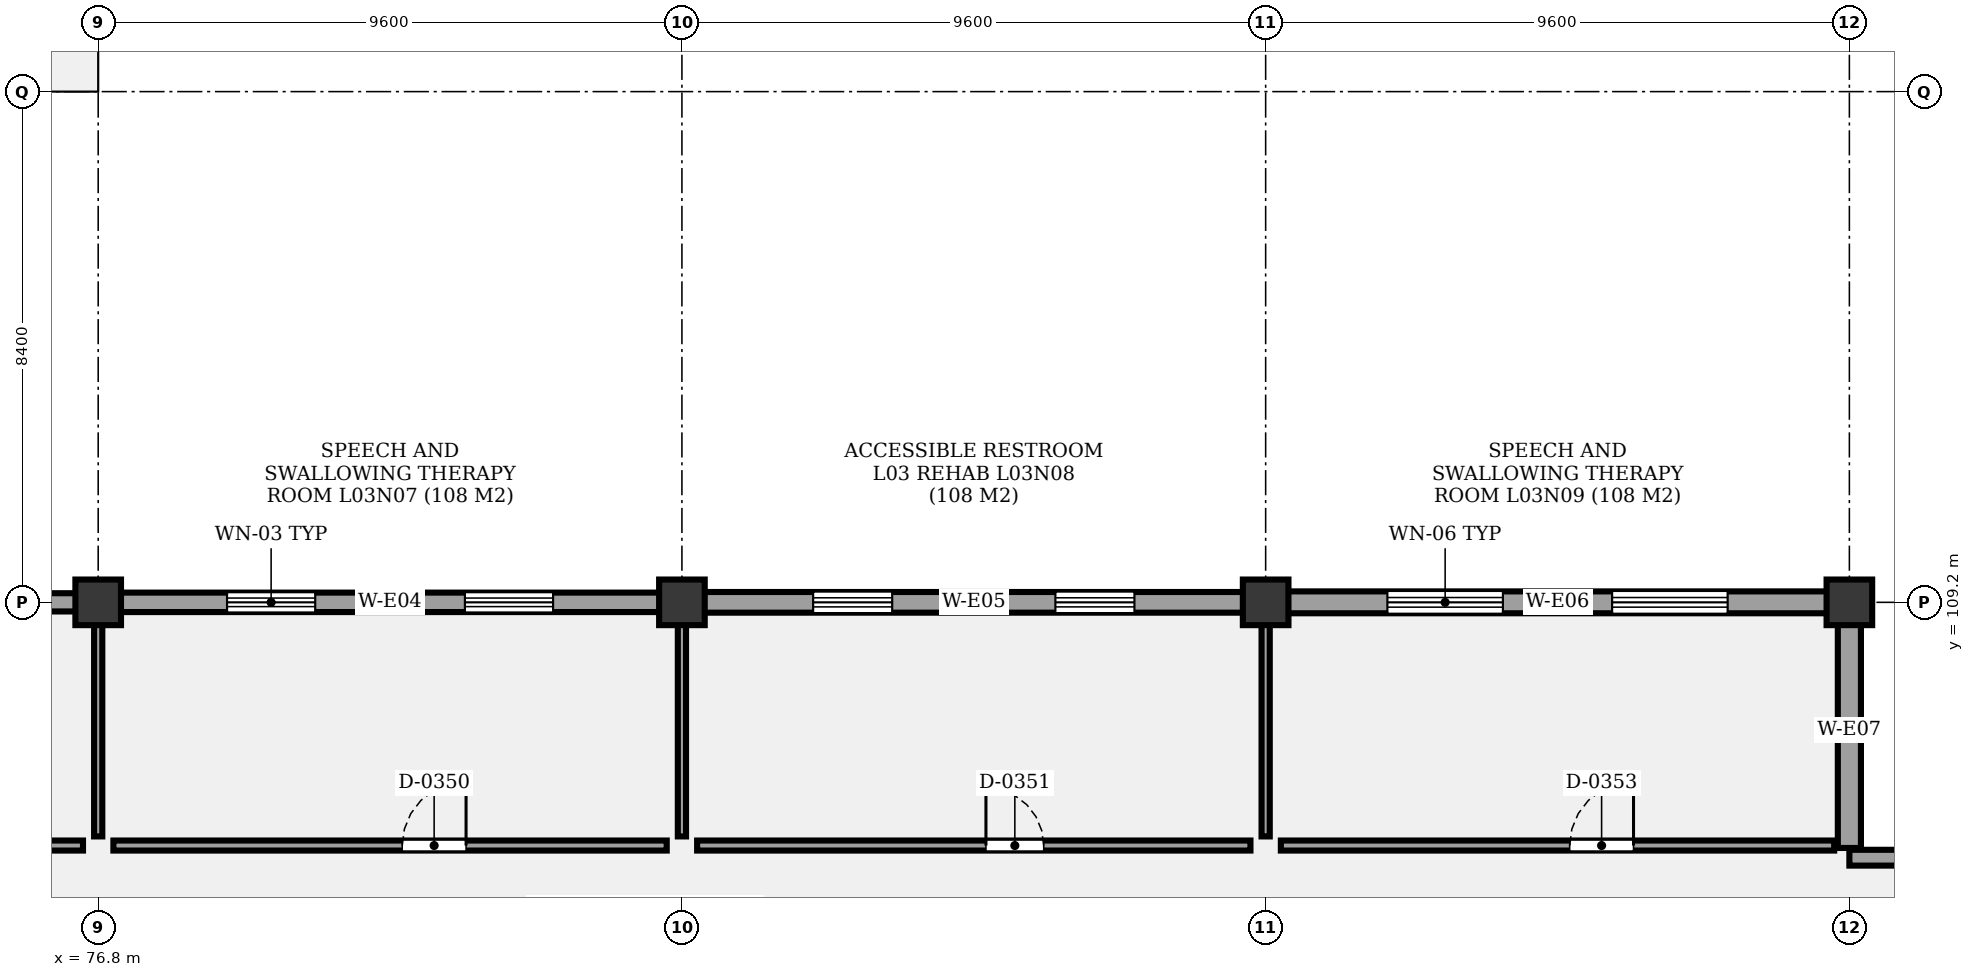
"""IFC4 building model, lengths in metres.
Left out: names, types, materials, properties, quantities, classifications, styles, units other than length and angle.
Written with IfcOpenShell. Run it as: python <this file> out.ifc"""

import sys

from ifc_helpers import new_model, si_unit, direction, frame, frame_2d, origin, origin_2d, place, context, subcontext, project, spatial, rectangle, extrude, element, fill, save


model = new_model("IFC4")
c1 = context("Model", 3, precision=1e-05, world=origin(), true_north=direction((0.0, 1.0)))
c2 = subcontext(c1, "Body", "Model", "MODEL_VIEW")
j1 = project(units=[si_unit("LENGTHUNIT", "METRE"), si_unit("PLANEANGLEUNIT", "RADIAN")], contexts=[c1])
p1 = place(None, origin())
s1 = spatial("IfcSite", under=j1, at=p1, CompositionType="ELEMENT")
p2 = place(p1, origin())
s2 = spatial("IfcBuilding", under=s1, at=p2, CompositionType="ELEMENT")
p3 = place(p2, frame((0.0, 0.0, 13.5)))
s3 = spatial("IfcBuildingStorey", under=s2, at=p3, CompositionType="ELEMENT", Elevation=13.5)
for number, where, z_axis, x_axis in (
    (1, (76.8, 109.2, 0.0), (0.0, 0.0, 1.0), (1.0, 0.0, 0.0)),
    (2, (86.4, 109.2, 0.0), (0.0, 0.0, 1.0), (1.0, 0.0, 0.0)),
    (3, (96.0, 109.2, 0.0), (0.0, 0.0, 1.0), (1.0, 0.0, 0.0)),
    (4, (105.6, 109.2, 0.0), (0.0, 0.0, 1.0), (1.0, 0.0, 0.0)),
):
    element("IfcColumn", number, at=place(p3, frame(where, z_axis=z_axis, x_axis=x_axis)), inside=s3, PredefinedType="COLUMN", context=c2, shape_type="SweptSolid", body=[
        extrude(rectangle(XDim=0.75, YDim=0.75, at=origin_2d()), origin(), (0.0, 0.0, 1.0), 4.3),
    ])
p4 = place(p3, frame((105.6, 105.0, 0.0), z_axis=(0.0, 0.0, 1.0), x_axis=(1.0, 0.0, 0.0)))
e5 = element("IfcWall", 5, at=p4, inside=s3, PredefinedType="SOLIDWALL", context=c2, shape_type="SweptSolid", body=[
    extrude(rectangle(XDim=9.6, YDim=0.26, at=frame_2d((4.8, 0.0))), origin(), (0.0, 0.0, 1.0), 3.49),
])
p5 = place(p4, frame((2.041, 0.0, 0.85)))
e6 = element("IfcOpeningElement", 6, at=p5, cuts=e5, PredefinedType="OPENING", context=c2, shape_type="SweptSolid", body=[
    extrude(rectangle(XDim=1.75, YDim=1.2, at=frame_2d((0.875, 0.6))), frame((0.0, 0.14, 0.0), z_axis=(0.0, -1.0, 0.0), x_axis=(1.0, 0.0, 0.0)), (0.0, 0.0, 1.0), 0.28),
])
p6 = place(p4, frame((5.809, 0.0, 0.85)))
e7 = element("IfcOpeningElement", 7, at=p6, cuts=e5, PredefinedType="OPENING", context=c2, shape_type="SweptSolid", body=[
    extrude(rectangle(XDim=1.75, YDim=1.2, at=frame_2d((0.875, 0.6))), frame((0.0, 0.14, 0.0), z_axis=(0.0, -1.0, 0.0), x_axis=(1.0, 0.0, 0.0)), (0.0, 0.0, 1.0), 0.28),
])
p7 = place(p3, frame((67.2, 109.2, 0.0), z_axis=(0.0, 0.0, 1.0), x_axis=(1.0, 0.0, 0.0)))
e8 = element("IfcWall", 8, at=p7, inside=s3, PredefinedType="SOLIDWALL", context=c2, shape_type="SweptSolid", body=[
    extrude(rectangle(XDim=9.6, YDim=0.3, at=frame_2d((4.8, 0.0))), origin(), (0.0, 0.0, 1.0), 3.49),
])
p8 = place(p7, frame((2.158, 0.0, 0.85)))
e9 = element("IfcOpeningElement", 9, at=p8, cuts=e8, PredefinedType="OPENING", context=c2, shape_type="SweptSolid", body=[
    extrude(rectangle(XDim=1.3, YDim=1.2, at=frame_2d((0.65, 0.6))), frame((0.0, 0.16, 0.0), z_axis=(0.0, -1.0, 0.0), x_axis=(1.0, 0.0, 0.0)), (0.0, 0.0, 1.0), 0.32),
])
p9 = place(p7, frame((6.142, 0.0, 0.85)))
e10 = element("IfcOpeningElement", 10, at=p9, cuts=e8, PredefinedType="OPENING", context=c2, shape_type="SweptSolid", body=[
    extrude(rectangle(XDim=1.3, YDim=1.2, at=frame_2d((0.65, 0.6))), frame((0.0, 0.16, 0.0), z_axis=(0.0, -1.0, 0.0), x_axis=(1.0, 0.0, 0.0)), (0.0, 0.0, 1.0), 0.32),
])
p10 = place(p3, frame((76.8, 109.2, 0.0), z_axis=(0.0, 0.0, 1.0), x_axis=(1.0, 0.0, 0.0)))
e11 = element("IfcWall", 11, at=p10, inside=s3, PredefinedType="SOLIDWALL", context=c2, shape_type="SweptSolid", body=[
    extrude(rectangle(XDim=9.6, YDim=0.32, at=frame_2d((4.8, 0.0))), origin(), (0.0, 0.0, 1.0), 3.49),
])
p11 = place(p10, frame((2.119, 0.0, 0.85)))
e12 = element("IfcOpeningElement", 12, at=p11, cuts=e11, PredefinedType="OPENING", context=c2, shape_type="SweptSolid", body=[
    extrude(rectangle(XDim=1.45, YDim=1.2, at=frame_2d((0.725, 0.6))), frame((0.0, 0.17, 0.0), z_axis=(0.0, -1.0, 0.0), x_axis=(1.0, 0.0, 0.0)), (0.0, 0.0, 1.0), 0.34),
])
p12 = place(p10, frame((6.031, 0.0, 0.85)))
e13 = element("IfcOpeningElement", 13, at=p12, cuts=e11, PredefinedType="OPENING", context=c2, shape_type="SweptSolid", body=[
    extrude(rectangle(XDim=1.45, YDim=1.2, at=frame_2d((0.725, 0.6))), frame((0.0, 0.17, 0.0), z_axis=(0.0, -1.0, 0.0), x_axis=(1.0, 0.0, 0.0)), (0.0, 0.0, 1.0), 0.34),
])
p13 = place(p3, frame((86.4, 109.2, 0.0), z_axis=(0.0, 0.0, 1.0), x_axis=(1.0, 0.0, 0.0)))
e14 = element("IfcWall", 14, at=p13, inside=s3, PredefinedType="SOLIDWALL", context=c2, shape_type="SweptSolid", body=[
    extrude(rectangle(XDim=9.6, YDim=0.34, at=frame_2d((4.8, 0.0))), origin(), (0.0, 0.0, 1.0), 3.49),
])
p14 = place(p13, frame((2.158, 0.0, 0.85)))
e15 = element("IfcOpeningElement", 15, at=p14, cuts=e14, PredefinedType="OPENING", context=c2, shape_type="SweptSolid", body=[
    extrude(rectangle(XDim=1.3, YDim=1.2, at=frame_2d((0.65, 0.6))), frame((0.0, 0.18, 0.0), z_axis=(0.0, -1.0, 0.0), x_axis=(1.0, 0.0, 0.0)), (0.0, 0.0, 1.0), 0.36),
])
p15 = place(p13, frame((6.142, 0.0, 0.85)))
e16 = element("IfcOpeningElement", 16, at=p15, cuts=e14, PredefinedType="OPENING", context=c2, shape_type="SweptSolid", body=[
    extrude(rectangle(XDim=1.3, YDim=1.2, at=frame_2d((0.65, 0.6))), frame((0.0, 0.18, 0.0), z_axis=(0.0, -1.0, 0.0), x_axis=(1.0, 0.0, 0.0)), (0.0, 0.0, 1.0), 0.36),
])
p16 = place(p3, frame((96.0, 109.2, 0.0), z_axis=(0.0, 0.0, 1.0), x_axis=(1.0, 0.0, 0.0)))
e17 = element("IfcWall", 17, at=p16, inside=s3, PredefinedType="SOLIDWALL", context=c2, shape_type="SweptSolid", body=[
    extrude(rectangle(XDim=9.6, YDim=0.36, at=frame_2d((4.8, 0.0))), origin(), (0.0, 0.0, 1.0), 3.49),
])
p17 = place(p16, frame((2.002, 0.0, 0.85)))
e18 = element("IfcOpeningElement", 18, at=p17, cuts=e17, PredefinedType="OPENING", context=c2, shape_type="SweptSolid", body=[
    extrude(rectangle(XDim=1.9, YDim=1.2, at=frame_2d((0.95, 0.6))), frame((0.0, 0.19, 0.0), z_axis=(0.0, -1.0, 0.0), x_axis=(1.0, 0.0, 0.0)), (0.0, 0.0, 1.0), 0.38),
])
p18 = place(p16, frame((5.698, 0.0, 0.85)))
e19 = element("IfcOpeningElement", 19, at=p18, cuts=e17, PredefinedType="OPENING", context=c2, shape_type="SweptSolid", body=[
    extrude(rectangle(XDim=1.9, YDim=1.2, at=frame_2d((0.95, 0.6))), frame((0.0, 0.19, 0.0), z_axis=(0.0, -1.0, 0.0), x_axis=(1.0, 0.0, 0.0)), (0.0, 0.0, 1.0), 0.38),
])
p19 = place(p3, frame((105.6, 109.04, 0.0), z_axis=(0.0, 0.0, 1.0), x_axis=(0.0, -1.0, 0.0)))
e20 = element("IfcWall", 20, at=p19, inside=s3, PredefinedType="SOLIDWALL", context=c2, shape_type="SweptSolid", body=[
    extrude(rectangle(XDim=3.88, YDim=0.38, at=frame_2d((1.94, 0.0))), origin(), (0.0, 0.0, 1.0), 3.49),
])
p20 = place(p3, frame((67.45, 105.2, 0.0), z_axis=(0.0, 0.0, 1.0), x_axis=(1.0, 0.0, 0.0)))
e21 = element("IfcWall", 21, at=p20, inside=s3, PredefinedType="PARTITIONING", context=c2, shape_type="SweptSolid", body=[
    extrude(rectangle(XDim=9.1, YDim=0.165, at=frame_2d((4.55, 0.0))), origin(), (0.0, 0.0, 1.0), 3.4),
])
p21 = place(p20, frame((4.75, 0.0, 0.0)))
e22 = element("IfcOpeningElement", 22, at=p21, cuts=e21, PredefinedType="OPENING", context=c2, shape_type="SweptSolid", body=[
    extrude(rectangle(XDim=0.95, YDim=2.1, at=frame_2d((0.475, 1.05))), frame((0.0, 0.093, 0.0), z_axis=(0.0, -1.0, 0.0), x_axis=(1.0, 0.0, 0.0)), (0.0, 0.0, 1.0), 0.185),
])
p22 = place(p3, frame((77.05, 105.2, 0.0), z_axis=(0.0, 0.0, 1.0), x_axis=(1.0, 0.0, 0.0)))
e23 = element("IfcWall", 23, at=p22, inside=s3, PredefinedType="PARTITIONING", context=c2, shape_type="SweptSolid", body=[
    extrude(rectangle(XDim=9.1, YDim=0.165, at=frame_2d((4.55, 0.0))), origin(), (0.0, 0.0, 1.0), 3.4),
])
p23 = place(p22, frame((4.75, 0.0, 0.0)))
e24 = element("IfcOpeningElement", 24, at=p23, cuts=e23, PredefinedType="OPENING", context=c2, shape_type="SweptSolid", body=[
    extrude(rectangle(XDim=1.05, YDim=2.1, at=frame_2d((0.525, 1.05))), frame((0.0, 0.093, 0.0), z_axis=(0.0, -1.0, 0.0), x_axis=(1.0, 0.0, 0.0)), (0.0, 0.0, 1.0), 0.185),
])
p24 = place(p3, frame((76.8, 105.35, 0.0), z_axis=(0.0, 0.0, 1.0), x_axis=(0.0, 1.0, 0.0)))
e25 = element("IfcWall", 25, at=p24, inside=s3, PredefinedType="PARTITIONING", context=c2, shape_type="SweptSolid", body=[
    extrude(rectangle(XDim=3.65, YDim=0.135, at=frame_2d((1.825, 0.0))), origin(), (0.0, 0.0, 1.0), 3.4),
])
p25 = place(p3, frame((86.65, 105.2, 0.0), z_axis=(0.0, 0.0, 1.0), x_axis=(1.0, 0.0, 0.0)))
e26 = element("IfcWall", 26, at=p25, inside=s3, PredefinedType="PARTITIONING", context=c2, shape_type="SweptSolid", body=[
    extrude(rectangle(XDim=9.1, YDim=0.165, at=frame_2d((4.55, 0.0))), origin(), (0.0, 0.0, 1.0), 3.4),
])
p26 = place(p25, frame((4.75, 0.0, 0.0)))
e27 = element("IfcOpeningElement", 27, at=p26, cuts=e26, PredefinedType="OPENING", context=c2, shape_type="SweptSolid", body=[
    extrude(rectangle(XDim=0.95, YDim=2.1, at=frame_2d((0.475, 1.05))), frame((0.0, 0.093, 0.0), z_axis=(0.0, -1.0, 0.0), x_axis=(1.0, 0.0, 0.0)), (0.0, 0.0, 1.0), 0.185),
])
p27 = place(p3, frame((86.4, 105.35, 0.0), z_axis=(0.0, 0.0, 1.0), x_axis=(0.0, 1.0, 0.0)))
e28 = element("IfcWall", 28, at=p27, inside=s3, PredefinedType="PARTITIONING", context=c2, shape_type="SweptSolid", body=[
    extrude(rectangle(XDim=3.65, YDim=0.135, at=frame_2d((1.825, 0.0))), origin(), (0.0, 0.0, 1.0), 3.4),
])
p28 = place(p3, frame((96.25, 105.2, 0.0), z_axis=(0.0, 0.0, 1.0), x_axis=(1.0, 0.0, 0.0)))
e29 = element("IfcWall", 29, at=p28, inside=s3, PredefinedType="PARTITIONING", context=c2, shape_type="SweptSolid", body=[
    extrude(rectangle(XDim=9.1, YDim=0.165, at=frame_2d((4.55, 0.0))), origin(), (0.0, 0.0, 1.0), 3.4),
])
p29 = place(p28, frame((4.75, 0.0, 0.0)))
e30 = element("IfcOpeningElement", 30, at=p29, cuts=e29, PredefinedType="OPENING", context=c2, shape_type="SweptSolid", body=[
    extrude(rectangle(XDim=1.05, YDim=2.1, at=frame_2d((0.525, 1.05))), frame((0.0, 0.093, 0.0), z_axis=(0.0, -1.0, 0.0), x_axis=(1.0, 0.0, 0.0)), (0.0, 0.0, 1.0), 0.185),
])
p30 = place(p3, frame((96.0, 105.35, 0.0), z_axis=(0.0, 0.0, 1.0), x_axis=(0.0, 1.0, 0.0)))
e31 = element("IfcWall", 31, at=p30, inside=s3, PredefinedType="PARTITIONING", context=c2, shape_type="SweptSolid", body=[
    extrude(rectangle(XDim=3.65, YDim=0.135, at=frame_2d((1.825, 0.0))), origin(), (0.0, 0.0, 1.0), 3.4),
])
p31 = place(p11, origin())
e32 = element("IfcWindow", 32, at=p31, inside=s3, PartitioningType="SINGLE_PANEL", PredefinedType="WINDOW", context=c2, shape_type="SweptSolid", body=[
    extrude(rectangle(XDim=1.45, YDim=1.2, at=frame_2d((0.725, 0.6))), frame((0.0, 0.03, 0.0), z_axis=(0.0, -1.0, 0.0), x_axis=(1.0, 0.0, 0.0)), (0.0, 0.0, 1.0), 0.06),
])
fill(e12, e32)
p32 = place(p12, origin())
e33 = element("IfcWindow", 33, at=p32, inside=s3, PartitioningType="SINGLE_PANEL", PredefinedType="WINDOW", context=c2, shape_type="SweptSolid", body=[
    extrude(rectangle(XDim=1.45, YDim=1.2, at=frame_2d((0.725, 0.6))), frame((0.0, 0.03, 0.0), z_axis=(0.0, -1.0, 0.0), x_axis=(1.0, 0.0, 0.0)), (0.0, 0.0, 1.0), 0.06),
])
fill(e13, e33)
p33 = place(p14, origin())
e34 = element("IfcWindow", 34, at=p33, inside=s3, PartitioningType="SINGLE_PANEL", PredefinedType="WINDOW", context=c2, shape_type="SweptSolid", body=[
    extrude(rectangle(XDim=1.3, YDim=1.2, at=frame_2d((0.65, 0.6))), frame((0.0, 0.03, 0.0), z_axis=(0.0, -1.0, 0.0), x_axis=(1.0, 0.0, 0.0)), (0.0, 0.0, 1.0), 0.06),
])
fill(e15, e34)
p34 = place(p15, origin())
e35 = element("IfcWindow", 35, at=p34, inside=s3, PartitioningType="SINGLE_PANEL", PredefinedType="WINDOW", context=c2, shape_type="SweptSolid", body=[
    extrude(rectangle(XDim=1.3, YDim=1.2, at=frame_2d((0.65, 0.6))), frame((0.0, 0.03, 0.0), z_axis=(0.0, -1.0, 0.0), x_axis=(1.0, 0.0, 0.0)), (0.0, 0.0, 1.0), 0.06),
])
fill(e16, e35)
p35 = place(p17, origin())
e36 = element("IfcWindow", 36, at=p35, inside=s3, PartitioningType="SINGLE_PANEL", PredefinedType="WINDOW", context=c2, shape_type="SweptSolid", body=[
    extrude(rectangle(XDim=1.9, YDim=1.2, at=frame_2d((0.95, 0.6))), frame((0.0, 0.03, 0.0), z_axis=(0.0, -1.0, 0.0), x_axis=(1.0, 0.0, 0.0)), (0.0, 0.0, 1.0), 0.06),
])
fill(e18, e36)
p36 = place(p18, origin())
e37 = element("IfcWindow", 37, at=p36, inside=s3, PartitioningType="SINGLE_PANEL", PredefinedType="WINDOW", context=c2, shape_type="SweptSolid", body=[
    extrude(rectangle(XDim=1.9, YDim=1.2, at=frame_2d((0.95, 0.6))), frame((0.0, 0.03, 0.0), z_axis=(0.0, -1.0, 0.0), x_axis=(1.0, 0.0, 0.0)), (0.0, 0.0, 1.0), 0.06),
])
fill(e19, e37)
p37 = place(p23, origin())
e38 = element("IfcDoor", 38, at=p37, inside=s3, OperationType="SINGLE_SWING_RIGHT", PredefinedType="DOOR", context=c2, shape_type="SweptSolid", body=[
    extrude(rectangle(XDim=1.05, YDim=2.1, at=frame_2d((0.525, 1.05))), frame((0.0, 0.025, 0.0), z_axis=(0.0, -1.0, 0.0), x_axis=(1.0, 0.0, 0.0)), (0.0, 0.0, 1.0), 0.05),
])
fill(e24, e38)
p38 = place(p26, origin())
e39 = element("IfcDoor", 39, at=p38, inside=s3, OperationType="SINGLE_SWING_LEFT", PredefinedType="DOOR", context=c2, shape_type="SweptSolid", body=[
    extrude(rectangle(XDim=0.95, YDim=2.1, at=frame_2d((0.475, 1.05))), frame((0.0, 0.025, 0.0), z_axis=(0.0, -1.0, 0.0), x_axis=(1.0, 0.0, 0.0)), (0.0, 0.0, 1.0), 0.05),
])
fill(e27, e39)
p39 = place(p29, origin())
e40 = element("IfcDoor", 40, at=p39, inside=s3, OperationType="SINGLE_SWING_RIGHT", PredefinedType="DOOR", context=c2, shape_type="SweptSolid", body=[
    extrude(rectangle(XDim=1.05, YDim=2.1, at=frame_2d((0.525, 1.05))), frame((0.0, 0.025, 0.0), z_axis=(0.0, -1.0, 0.0), x_axis=(1.0, 0.0, 0.0)), (0.0, 0.0, 1.0), 0.05),
])
fill(e30, e40)
save(model, sys.argv[1])
